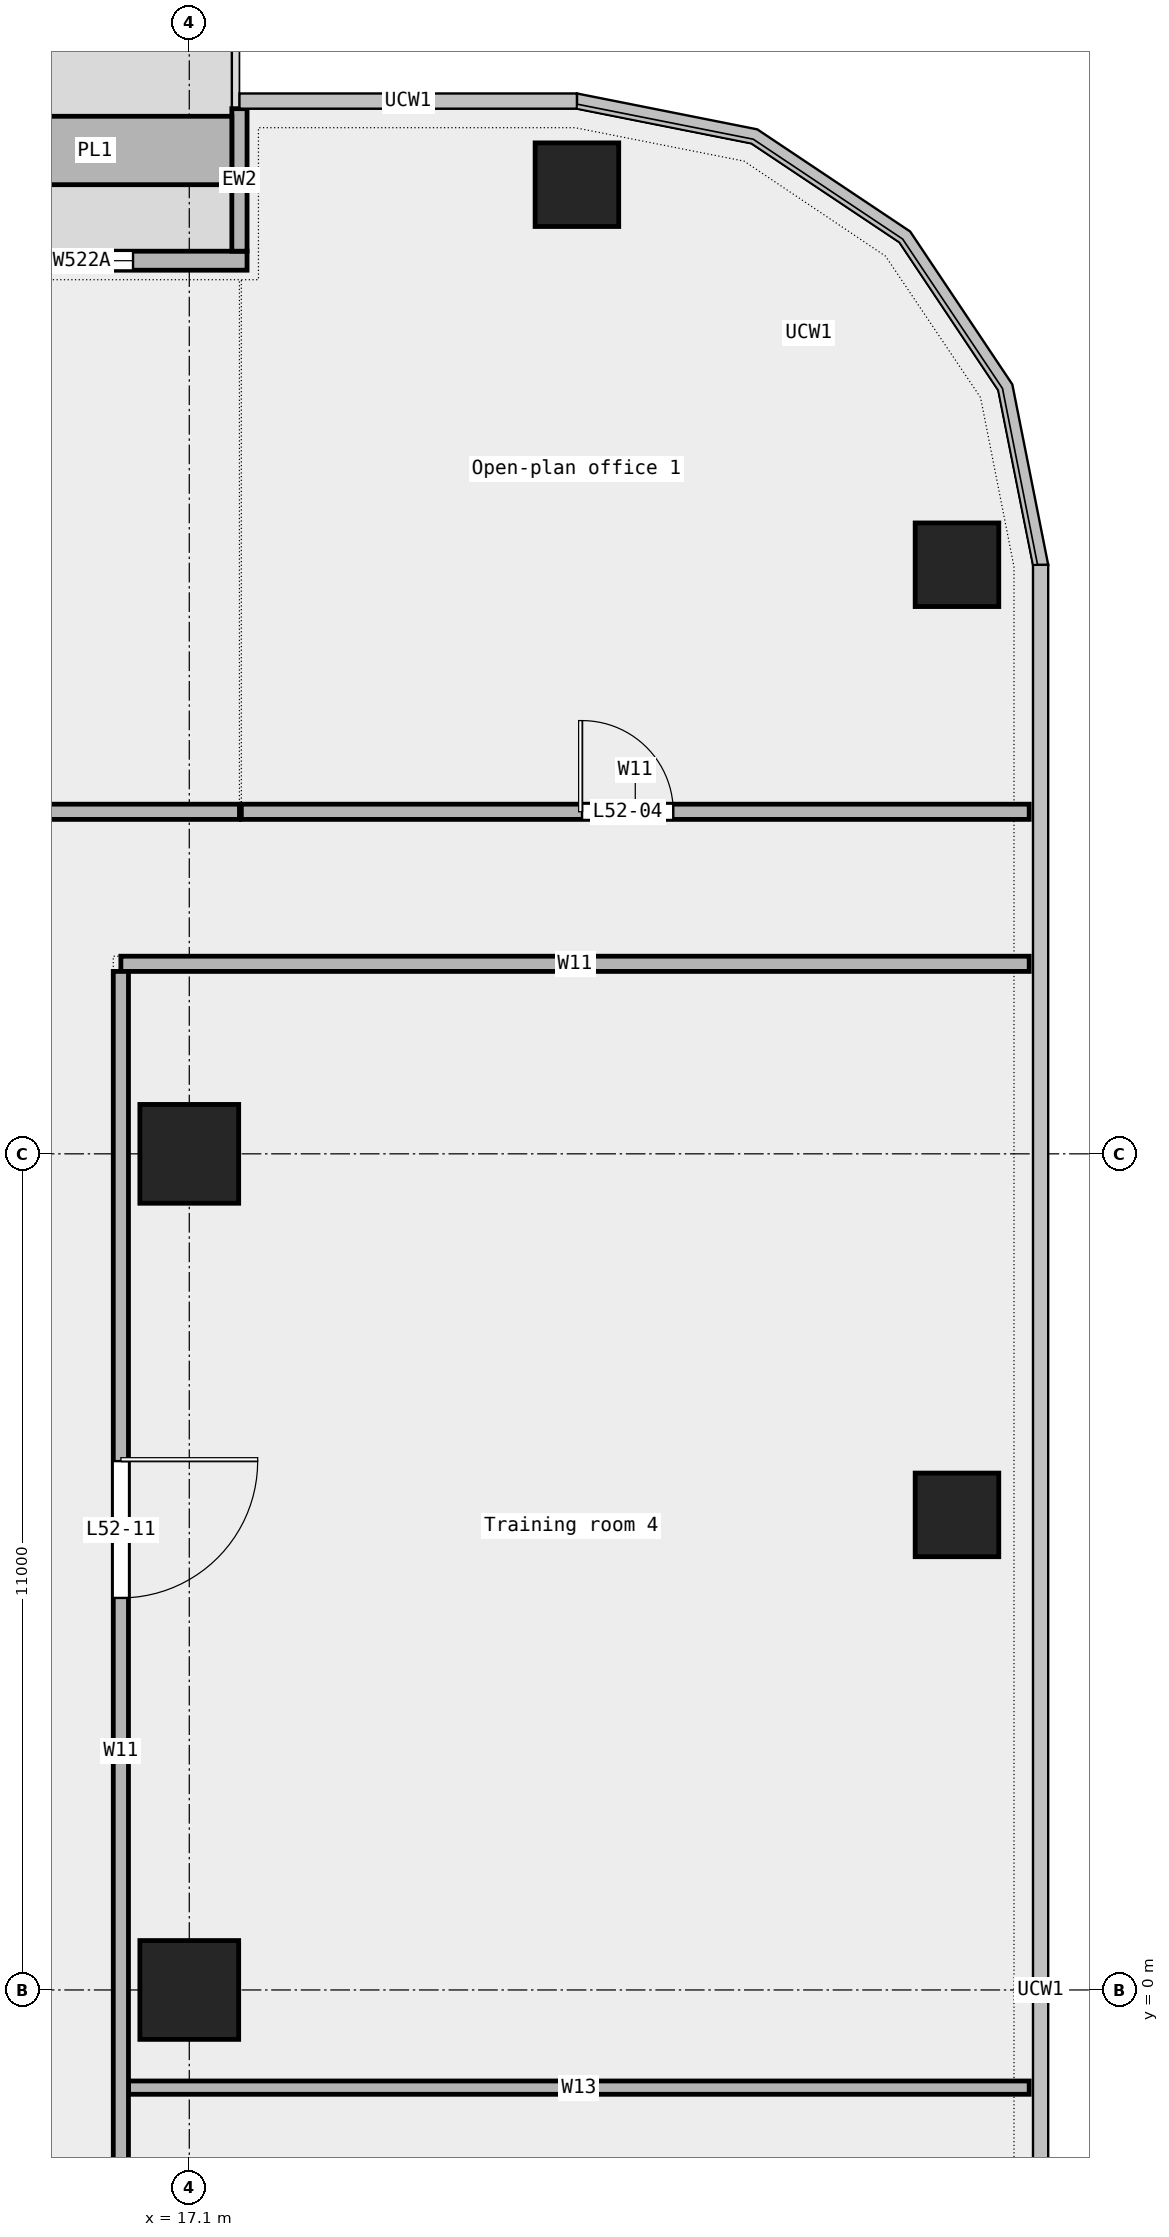
"""IFC4 building model, lengths in metres.
Left out: names, types, materials, properties, quantities, classifications, styles, units other than length and angle.
Written with IfcOpenShell. Run it as: python <this file> out.ifc"""

import sys

from ifc_helpers import new_model, si_unit, direction, frame, frame_2d, origin, origin_2d, place, context, subcontext, project, spatial, rectangle, extrude, element, fill, save


model = new_model("IFC4")
c1 = context("Model", 3, precision=1e-05, world=origin(), true_north=direction((0.0, 1.0)))
c2 = subcontext(c1, "Body", "Model", "MODEL_VIEW")
j1 = project(units=[si_unit("LENGTHUNIT", "METRE"), si_unit("PLANEANGLEUNIT", "RADIAN")], contexts=[c1])
p1 = place(None, origin())
s1 = spatial("IfcSite", under=j1, at=p1, CompositionType="ELEMENT")
p2 = place(p1, origin())
s2 = spatial("IfcBuilding", under=s1, at=p2, CompositionType="ELEMENT")
p3 = place(p2, frame((0.0, 0.0, 243.0)))
s3 = spatial("IfcBuildingStorey", under=s2, at=p3, CompositionType="ELEMENT", Elevation=243.0)
for number, where, z_axis, x_axis in (
    (1, (27.2, 6.25, 0.0), (0.0, 0.0, 1.0), (1.0, 0.0, 0.0)),
    (2, (27.2, 18.75, 0.0), (0.0, 0.0, 1.0), (1.0, 0.0, 0.0)),
    (3, (22.2, 23.75, 0.0), (0.0, 0.0, 1.0), (1.0, 0.0, 0.0)),
):
    element("IfcColumn", number, at=place(p3, frame(where, z_axis=z_axis, x_axis=x_axis)), inside=s3, PredefinedType="COLUMN", context=c2, shape_type="SweptSolid", body=[
        extrude(rectangle(XDim=1.1, YDim=1.1, at=origin_2d()), origin(), (0.0, 0.0, 1.0), 3.6),
    ])
for number, where, z_axis, x_axis in (
    (4, (17.1, 0.0, 0.0), (0.0, 0.0, 1.0), (1.0, 0.0, 0.0)),
    (5, (17.1, 11.0, 0.0), (0.0, 0.0, 1.0), (1.0, 0.0, 0.0)),
):
    element("IfcColumn", number, at=place(p3, frame(where, z_axis=z_axis, x_axis=x_axis)), inside=s3, PredefinedType="COLUMN", context=c2, shape_type="SweptSolid", body=[
        extrude(rectangle(XDim=1.3, YDim=1.3, at=origin_2d()), origin(), (0.0, 0.0, 1.0), 3.6),
    ])
p4 = place(p3, frame((17.86, 22.75, 0.0), z_axis=(0.0, 0.0, 1.0), x_axis=(-1.0, 0.0, 0.0)))
e6 = element("IfcWall", 6, at=p4, inside=s3, PredefinedType="STANDARD", context=c2, shape_type="SweptSolid", body=[
    extrude(rectangle(XDim=13.52, YDim=0.25, at=frame_2d((6.76, 0.0))), origin(), (0.0, 0.0, 1.0), 3.6),
])
p5 = place(p4, frame((1.5, 0.0, 0.45)))
e7 = element("IfcOpeningElement", 7, at=p5, cuts=e6, PredefinedType="OPENING", context=c2, shape_type="SweptSolid", body=[
    extrude(rectangle(XDim=1.5, YDim=2.4, at=frame_2d((0.75, 1.2))), frame((0.0, 0.137, 0.0), z_axis=(0.0, -1.0, 0.0), x_axis=(1.0, 0.0, 0.0)), (0.0, 0.0, 1.0), 0.274),
])
p6 = place(p4, frame((4.0, 0.0, 0.0)))
e8 = element("IfcOpeningElement", 8, at=p6, cuts=e6, PredefinedType="OPENING", context=c2, shape_type="SweptSolid", body=[
    extrude(rectangle(XDim=1.8, YDim=2.4, at=frame_2d((0.9, 1.2))), frame((0.0, 0.137, 0.0), z_axis=(0.0, -1.0, 0.0), x_axis=(1.0, 0.0, 0.0)), (0.0, 0.0, 1.0), 0.274),
])
p7 = place(p4, frame((10.5, 0.0, 0.45)))
e9 = element("IfcOpeningElement", 9, at=p7, cuts=e6, PredefinedType="OPENING", context=c2, shape_type="SweptSolid", body=[
    extrude(rectangle(XDim=1.5, YDim=2.4, at=frame_2d((0.75, 1.2))), frame((0.0, 0.137, 0.0), z_axis=(0.0, -1.0, 0.0), x_axis=(1.0, 0.0, 0.0)), (0.0, 0.0, 1.0), 0.274),
])
p8 = place(p3, frame((17.76, 24.75, 0.0), z_axis=(0.0, 0.0, 1.0), x_axis=(0.0, -1.0, 0.0)))
e10 = element("IfcWall", 10, at=p8, inside=s3, PredefinedType="STANDARD", context=c2, shape_type="SweptSolid", body=[
    extrude(rectangle(XDim=1.875, YDim=0.2, at=frame_2d((0.938, 0.0))), origin(), (0.0, 0.0, 1.0), 3.6),
])
p9 = place(p3, frame((17.66, 24.2, 0.0), z_axis=(0.0, 0.0, 1.0), x_axis=(-1.0, 0.0, 0.0)))
e11 = element("IfcWall", 11, at=p9, inside=s3, PredefinedType="STANDARD", context=c2, shape_type="SweptSolid", body=[
    extrude(rectangle(XDim=3.6, YDim=0.9, at=frame_2d((1.8, 0.0))), origin(), (0.0, 0.0, 1.0), 0.7),
])
p10 = place(p3, frame((16.3, -1.285, 0.0), z_axis=(0.0, 0.0, 1.0), x_axis=(1.0, 0.0, 0.0)))
e12 = element("IfcWall", 12, at=p10, inside=s3, PredefinedType="PARTITIONING", context=c2, shape_type="SweptSolid", body=[
    extrude(rectangle(XDim=11.85, YDim=0.175, at=frame_2d((5.925, 0.0))), origin(), (0.0, 0.0, 1.0), 3.6),
])
p11 = place(p3, frame((16.2, 13.5, 0.0), z_axis=(0.0, 0.0, 1.0), x_axis=(1.0, 0.0, 0.0)))
e13 = element("IfcWall", 13, at=p11, inside=s3, PredefinedType="PARTITIONING", context=c2, shape_type="SweptSolid", body=[
    extrude(rectangle(XDim=11.95, YDim=0.2, at=frame_2d((5.975, 0.0))), origin(), (0.0, 0.0, 1.0), 3.6),
])
p12 = place(p3, frame((-28.15, 15.5, 0.0), z_axis=(0.0, 0.0, 1.0), x_axis=(1.0, 0.0, 0.0)))
e14 = element("IfcWall", 14, at=p12, inside=s3, PredefinedType="PARTITIONING", context=c2, shape_type="SweptSolid", body=[
    extrude(rectangle(XDim=45.91, YDim=0.2, at=frame_2d((22.955, 0.0))), origin(), (0.0, 0.0, 1.0), 3.6),
])
p13 = place(p12, frame((38.5, 0.0, 0.0)))
e15 = element("IfcOpeningElement", 15, at=p13, cuts=e14, PredefinedType="OPENING", context=c2, shape_type="SweptSolid", body=[
    extrude(rectangle(XDim=1.5, YDim=2.1, at=frame_2d((0.75, 1.05))), frame((0.0, 0.112, 0.0), z_axis=(0.0, -1.0, 0.0), x_axis=(1.0, 0.0, 0.0)), (0.0, 0.0, 1.0), 0.224),
])
p14 = place(p12, frame((9.462, 0.0, 0.0)))
e16 = element("IfcOpeningElement", 16, at=p14, cuts=e14, PredefinedType="OPENING", context=c2, shape_type="SweptSolid", body=[
    extrude(rectangle(XDim=1.8, YDim=2.1, at=frame_2d((0.9, 1.05))), frame((0.0, 0.112, 0.0), z_axis=(0.0, -1.0, 0.0), x_axis=(1.0, 0.0, 0.0)), (0.0, 0.0, 1.0), 0.224),
])
p15 = place(p12, frame((25.808, 0.0, 0.0)))
e17 = element("IfcOpeningElement", 17, at=p15, cuts=e14, PredefinedType="OPENING", context=c2, shape_type="SweptSolid", body=[
    extrude(rectangle(XDim=1.5, YDim=2.1, at=frame_2d((0.75, 1.05))), frame((0.0, 0.112, 0.0), z_axis=(0.0, -1.0, 0.0), x_axis=(1.0, 0.0, 0.0)), (0.0, 0.0, 1.0), 0.224),
])
p16 = place(p3, frame((17.785, 15.5, 0.0), z_axis=(0.0, 0.0, 1.0), x_axis=(1.0, 0.0, 0.0)))
e18 = element("IfcWall", 18, at=p16, inside=s3, PredefinedType="PARTITIONING", context=c2, shape_type="SweptSolid", body=[
    extrude(rectangle(XDim=10.365, YDim=0.2, at=frame_2d((5.183, 0.0))), origin(), (0.0, 0.0, 1.0), 3.6),
])
p17 = place(p16, frame((4.482, 0.0, 0.0)))
e19 = element("IfcOpeningElement", 19, at=p17, cuts=e18, PredefinedType="OPENING", context=c2, shape_type="SweptSolid", body=[
    extrude(rectangle(XDim=1.2, YDim=2.1, at=frame_2d((0.6, 1.05))), frame((0.0, 0.112, 0.0), z_axis=(0.0, -1.0, 0.0), x_axis=(1.0, 0.0, 0.0)), (0.0, 0.0, 1.0), 0.224),
])
p18 = place(p3, frame((16.2, -7.1, 0.0), z_axis=(0.0, 0.0, 1.0), x_axis=(0.0, 1.0, 0.0)))
e20 = element("IfcWall", 20, at=p18, inside=s3, PredefinedType="PARTITIONING", context=c2, shape_type="SweptSolid", body=[
    extrude(rectangle(XDim=20.5, YDim=0.2, at=frame_2d((10.25, 0.0))), origin(), (0.0, 0.0, 1.0), 3.6),
])
p19 = place(p18, frame((12.258, 0.0, 0.0)))
e21 = element("IfcOpeningElement", 21, at=p19, cuts=e20, PredefinedType="OPENING", context=c2, shape_type="SweptSolid", body=[
    extrude(rectangle(XDim=1.8, YDim=2.1, at=frame_2d((0.9, 1.05))), frame((0.0, 0.112, 0.0), z_axis=(0.0, -1.0, 0.0), x_axis=(1.0, 0.0, 0.0)), (0.0, 0.0, 1.0), 0.224),
])
p20 = place(p5, origin())
e22 = element("IfcWindow", 22, at=p20, inside=s3, PartitioningType="SINGLE_PANEL", PredefinedType="WINDOW", context=c2, shape_type="SweptSolid", body=[
    extrude(rectangle(XDim=1.5, YDim=2.4, at=frame_2d((0.75, 1.2))), frame((0.0, 0.03, 0.0), z_axis=(0.0, -1.0, 0.0), x_axis=(1.0, 0.0, 0.0)), (0.0, 0.0, 1.0), 0.06),
])
fill(e7, e22)
p21 = place(p17, origin())
e23 = element("IfcDoor", 23, at=p21, inside=s3, OperationType="SINGLE_SWING_LEFT", PredefinedType="DOOR", context=c2, shape_type="SweptSolid", body=[
    extrude(rectangle(XDim=1.2, YDim=2.1, at=frame_2d((0.6, 1.05))), frame((0.0, 0.025, 0.0), z_axis=(0.0, -1.0, 0.0), x_axis=(1.0, 0.0, 0.0)), (0.0, 0.0, 1.0), 0.05),
])
fill(e19, e23)
p22 = place(p19, origin())
e24 = element("IfcDoor", 24, at=p22, inside=s3, OperationType="DOUBLE_DOOR_SINGLE_SWING", PredefinedType="DOOR", context=c2, shape_type="SweptSolid", body=[
    extrude(rectangle(XDim=1.8, YDim=2.1, at=frame_2d((0.9, 1.05))), frame((0.0, 0.025, 0.0), z_axis=(0.0, -1.0, 0.0), x_axis=(1.0, 0.0, 0.0)), (0.0, 0.0, 1.0), 0.05),
])
fill(e21, e24)
save(model, sys.argv[1])
